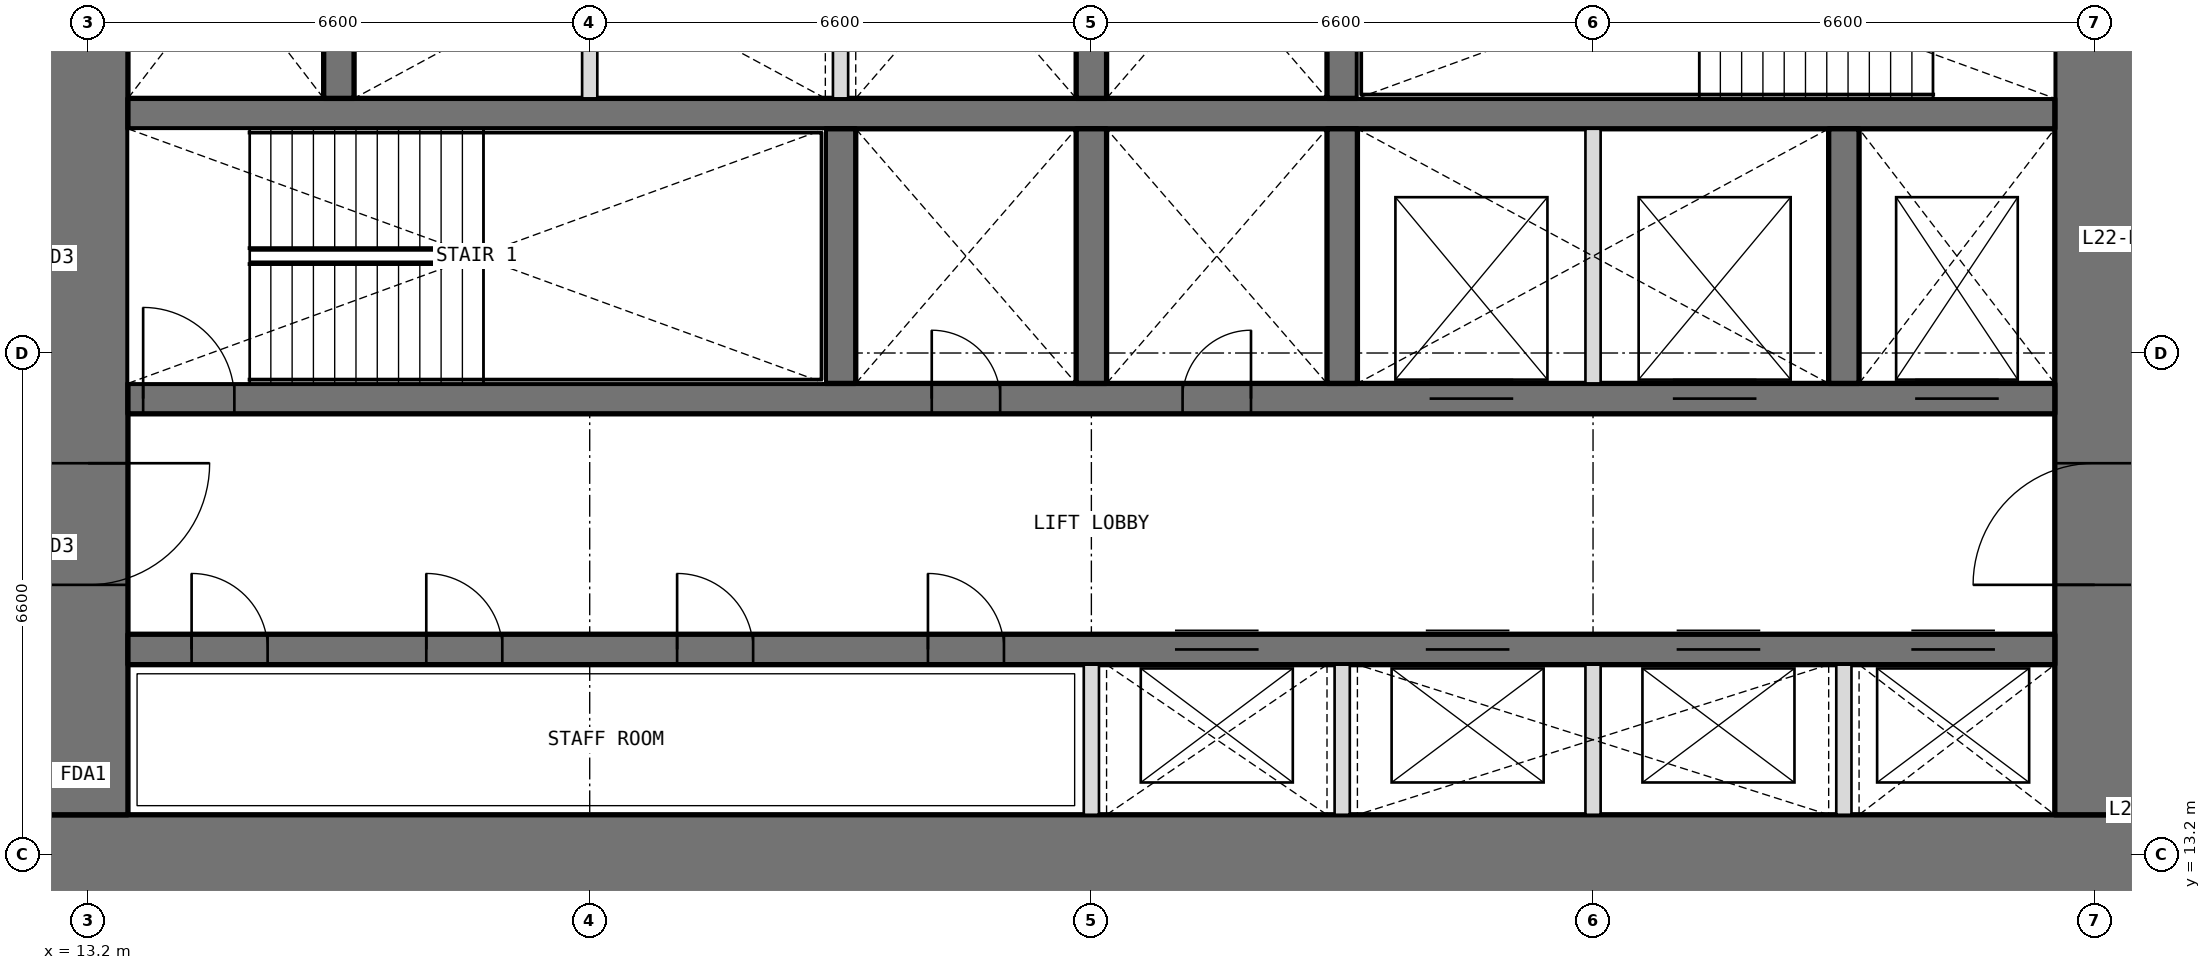
"""IFC4 building model, lengths in metres.
Left out: names, types, materials, properties, quantities, classifications, styles, units other than length and angle.
Written with IfcOpenShell. Run it as: python <this file> out.ifc"""

import sys

from ifc_helpers import new_model, si_unit, direction, frame, frame_2d, origin, place, context, subcontext, project, spatial, rectangle, extrude, element, fill, save


model = new_model("IFC4")
c1 = context("Model", 3, precision=1e-05, world=origin(), true_north=direction((0.0, 1.0)))
c2 = subcontext(c1, "Body", "Model", "MODEL_VIEW")
j1 = project(units=[si_unit("LENGTHUNIT", "METRE"), si_unit("PLANEANGLEUNIT", "RADIAN")], contexts=[c1])
p1 = place(None, origin())
s1 = spatial("IfcSite", under=j1, at=p1, CompositionType="ELEMENT")
p2 = place(p1, origin())
s2 = spatial("IfcBuilding", under=s1, at=p2, CompositionType="ELEMENT")
p3 = place(p2, frame((0.0, 0.0, 99.0)))
s3 = spatial("IfcBuildingStorey", under=s2, at=p3, CompositionType="ELEMENT", Elevation=99.0)
p4 = place(p3, frame((12.675, 13.2, 0.0), z_axis=(0.0, 0.0, 1.0), x_axis=(1.0, 0.0, 0.0)))
e1 = element("IfcWall", 1, at=p4, inside=s3, PredefinedType="SHEAR", context=c2, shape_type="SweptSolid", body=[
    extrude(rectangle(XDim=27.45, YDim=1.05, at=frame_2d((13.725, 0.0))), origin(), (0.0, 0.0, 1.0), 4.2),
])
p5 = place(p3, frame((39.6, 13.725, 0.0), z_axis=(0.0, 0.0, 1.0), x_axis=(0.0, 1.0, 0.0)))
e2 = element("IfcWall", 2, at=p5, inside=s3, PredefinedType="SHEAR", context=c2, shape_type="SweptSolid", body=[
    extrude(rectangle(XDim=18.75, YDim=1.05, at=frame_2d((9.375, 0.0))), origin(), (0.0, 0.0, 1.0), 4.2),
])
p6 = place(p5, frame((3.025, 0.0, 0.0)))
e3 = element("IfcOpeningElement", 3, at=p6, cuts=e2, PredefinedType="OPENING", context=c2, shape_type="SweptSolid", body=[
    extrude(rectangle(XDim=1.6, YDim=2.1, at=frame_2d((0.8, 1.05))), frame((0.0, 0.535, 0.0), z_axis=(0.0, -1.0, 0.0), x_axis=(1.0, 0.0, 0.0)), (0.0, 0.0, 1.0), 1.07),
])
p7 = place(p5, frame((13.825, 0.0, 0.0)))
e4 = element("IfcOpeningElement", 4, at=p7, cuts=e2, PredefinedType="OPENING", context=c2, shape_type="SweptSolid", body=[
    extrude(rectangle(XDim=1.6, YDim=2.1, at=frame_2d((0.8, 1.05))), frame((0.0, 0.535, 0.0), z_axis=(0.0, -1.0, 0.0), x_axis=(1.0, 0.0, 0.0)), (0.0, 0.0, 1.0), 1.07),
])
p8 = place(p3, frame((13.2, 32.475, 0.0), z_axis=(0.0, 0.0, 1.0), x_axis=(0.0, -1.0, 0.0)))
e5 = element("IfcWall", 5, at=p8, inside=s3, PredefinedType="SHEAR", context=c2, shape_type="SweptSolid", body=[
    extrude(rectangle(XDim=18.75, YDim=1.05, at=frame_2d((9.375, 0.0))), origin(), (0.0, 0.0, 1.0), 4.2),
])
p9 = place(p8, frame((14.125, 0.0, 0.0)))
e6 = element("IfcOpeningElement", 6, at=p9, cuts=e5, PredefinedType="OPENING", context=c2, shape_type="SweptSolid", body=[
    extrude(rectangle(XDim=1.6, YDim=2.1, at=frame_2d((0.8, 1.05))), frame((0.0, 0.535, 0.0), z_axis=(0.0, -1.0, 0.0), x_axis=(1.0, 0.0, 0.0)), (0.0, 0.0, 1.0), 1.07),
])
p10 = place(p8, frame((3.325, 0.0, 0.0)))
e7 = element("IfcOpeningElement", 7, at=p10, cuts=e5, PredefinedType="OPENING", context=c2, shape_type="SweptSolid", body=[
    extrude(rectangle(XDim=1.6, YDim=2.1, at=frame_2d((0.8, 1.05))), frame((0.0, 0.535, 0.0), z_axis=(0.0, -1.0, 0.0), x_axis=(1.0, 0.0, 0.0)), (0.0, 0.0, 1.0), 1.07),
])
p11 = place(p3, frame((13.725, 15.9, 0.0), z_axis=(0.0, 0.0, 1.0), x_axis=(1.0, 0.0, 0.0)))
e8 = element("IfcWall", 8, at=p11, inside=s3, PredefinedType="SHEAR", context=c2, shape_type="SweptSolid", body=[
    extrude(rectangle(XDim=25.35, YDim=0.4, at=frame_2d((12.675, 0.0))), origin(), (0.0, 0.0, 1.0), 4.2),
])
p12 = place(p11, frame((0.837, 0.0, 0.0)))
e9 = element("IfcOpeningElement", 9, at=p12, cuts=e8, PredefinedType="OPENING", context=c2, shape_type="SweptSolid", body=[
    extrude(rectangle(XDim=1.0, YDim=2.1, at=frame_2d((0.5, 1.05))), frame((0.0, 0.21, 0.0), z_axis=(0.0, -1.0, 0.0), x_axis=(1.0, 0.0, 0.0)), (0.0, 0.0, 1.0), 0.42),
])
p13 = place(p11, frame((3.925, 0.0, 0.0)))
e10 = element("IfcOpeningElement", 10, at=p13, cuts=e8, PredefinedType="OPENING", context=c2, shape_type="SweptSolid", body=[
    extrude(rectangle(XDim=1.0, YDim=2.1, at=frame_2d((0.5, 1.05))), frame((0.0, 0.21, 0.0), z_axis=(0.0, -1.0, 0.0), x_axis=(1.0, 0.0, 0.0)), (0.0, 0.0, 1.0), 0.42),
])
p14 = place(p11, frame((7.225, 0.0, 0.0)))
e11 = element("IfcOpeningElement", 11, at=p14, cuts=e8, PredefinedType="OPENING", context=c2, shape_type="SweptSolid", body=[
    extrude(rectangle(XDim=1.0, YDim=2.1, at=frame_2d((0.5, 1.05))), frame((0.0, 0.21, 0.0), z_axis=(0.0, -1.0, 0.0), x_axis=(1.0, 0.0, 0.0)), (0.0, 0.0, 1.0), 0.42),
])
p15 = place(p11, frame((10.525, 0.0, 0.0)))
e12 = element("IfcOpeningElement", 12, at=p15, cuts=e8, PredefinedType="OPENING", context=c2, shape_type="SweptSolid", body=[
    extrude(rectangle(XDim=1.0, YDim=2.1, at=frame_2d((0.5, 1.05))), frame((0.0, 0.21, 0.0), z_axis=(0.0, -1.0, 0.0), x_axis=(1.0, 0.0, 0.0)), (0.0, 0.0, 1.0), 0.42),
])
p16 = place(p11, frame((13.775, 0.0, 0.0)))
e13 = element("IfcOpeningElement", 13, at=p16, cuts=e8, PredefinedType="OPENING", context=c2, shape_type="SweptSolid", body=[
    extrude(rectangle(XDim=1.1, YDim=2.1, at=frame_2d((0.55, 1.05))), frame((0.0, 0.21, 0.0), z_axis=(0.0, -1.0, 0.0), x_axis=(1.0, 0.0, 0.0)), (0.0, 0.0, 1.0), 0.42),
])
p17 = place(p11, frame((17.075, 0.0, 0.0)))
e14 = element("IfcOpeningElement", 14, at=p17, cuts=e8, PredefinedType="OPENING", context=c2, shape_type="SweptSolid", body=[
    extrude(rectangle(XDim=1.1, YDim=2.1, at=frame_2d((0.55, 1.05))), frame((0.0, 0.21, 0.0), z_axis=(0.0, -1.0, 0.0), x_axis=(1.0, 0.0, 0.0)), (0.0, 0.0, 1.0), 0.42),
])
p18 = place(p11, frame((20.375, 0.0, 0.0)))
e15 = element("IfcOpeningElement", 15, at=p18, cuts=e8, PredefinedType="OPENING", context=c2, shape_type="SweptSolid", body=[
    extrude(rectangle(XDim=1.1, YDim=2.1, at=frame_2d((0.55, 1.05))), frame((0.0, 0.21, 0.0), z_axis=(0.0, -1.0, 0.0), x_axis=(1.0, 0.0, 0.0)), (0.0, 0.0, 1.0), 0.42),
])
p19 = place(p11, frame((23.462, 0.0, 0.0)))
e16 = element("IfcOpeningElement", 16, at=p19, cuts=e8, PredefinedType="OPENING", context=c2, shape_type="SweptSolid", body=[
    extrude(rectangle(XDim=1.1, YDim=2.1, at=frame_2d((0.55, 1.05))), frame((0.0, 0.21, 0.0), z_axis=(0.0, -1.0, 0.0), x_axis=(1.0, 0.0, 0.0)), (0.0, 0.0, 1.0), 0.42),
])
p20 = place(p3, frame((13.725, 19.2, 0.0), z_axis=(0.0, 0.0, 1.0), x_axis=(1.0, 0.0, 0.0)))
e17 = element("IfcWall", 17, at=p20, inside=s3, PredefinedType="SHEAR", context=c2, shape_type="SweptSolid", body=[
    extrude(rectangle(XDim=25.35, YDim=0.4, at=frame_2d((12.675, 0.0))), origin(), (0.0, 0.0, 1.0), 4.2),
])
p21 = place(p20, frame((10.575, 0.0, 0.0)))
e18 = element("IfcOpeningElement", 18, at=p21, cuts=e17, PredefinedType="OPENING", context=c2, shape_type="SweptSolid", body=[
    extrude(rectangle(XDim=0.9, YDim=2.1, at=frame_2d((0.45, 1.05))), frame((0.0, 0.21, 0.0), z_axis=(0.0, -1.0, 0.0), x_axis=(1.0, 0.0, 0.0)), (0.0, 0.0, 1.0), 0.42),
])
p22 = place(p20, frame((13.875, 0.0, 0.0)))
e19 = element("IfcOpeningElement", 19, at=p22, cuts=e17, PredefinedType="OPENING", context=c2, shape_type="SweptSolid", body=[
    extrude(rectangle(XDim=0.9, YDim=2.1, at=frame_2d((0.45, 1.05))), frame((0.0, 0.21, 0.0), z_axis=(0.0, -1.0, 0.0), x_axis=(1.0, 0.0, 0.0)), (0.0, 0.0, 1.0), 0.42),
])
p23 = place(p20, frame((0.2, 0.0, 0.0)))
e20 = element("IfcOpeningElement", 20, at=p23, cuts=e17, PredefinedType="OPENING", context=c2, shape_type="SweptSolid", body=[
    extrude(rectangle(XDim=1.2, YDim=2.1, at=frame_2d((0.6, 1.05))), frame((0.0, 0.21, 0.0), z_axis=(0.0, -1.0, 0.0), x_axis=(1.0, 0.0, 0.0)), (0.0, 0.0, 1.0), 0.42),
])
p24 = place(p20, frame((23.512, 0.0, 0.0)))
e21 = element("IfcOpeningElement", 21, at=p24, cuts=e17, PredefinedType="OPENING", context=c2, shape_type="SweptSolid", body=[
    extrude(rectangle(XDim=1.1, YDim=2.1, at=frame_2d((0.55, 1.05))), frame((0.0, 0.21, 0.0), z_axis=(0.0, -1.0, 0.0), x_axis=(1.0, 0.0, 0.0)), (0.0, 0.0, 1.0), 0.42),
])
p25 = place(p20, frame((17.125, 0.0, 0.0)))
e22 = element("IfcOpeningElement", 22, at=p25, cuts=e17, PredefinedType="OPENING", context=c2, shape_type="SweptSolid", body=[
    extrude(rectangle(XDim=1.1, YDim=2.1, at=frame_2d((0.55, 1.05))), frame((0.0, 0.21, 0.0), z_axis=(0.0, -1.0, 0.0), x_axis=(1.0, 0.0, 0.0)), (0.0, 0.0, 1.0), 0.42),
])
p26 = place(p20, frame((20.325, 0.0, 0.0)))
e23 = element("IfcOpeningElement", 23, at=p26, cuts=e17, PredefinedType="OPENING", context=c2, shape_type="SweptSolid", body=[
    extrude(rectangle(XDim=1.1, YDim=2.1, at=frame_2d((0.55, 1.05))), frame((0.0, 0.21, 0.0), z_axis=(0.0, -1.0, 0.0), x_axis=(1.0, 0.0, 0.0)), (0.0, 0.0, 1.0), 0.42),
])
p27 = place(p3, frame((13.725, 22.95, 0.0), z_axis=(0.0, 0.0, 1.0), x_axis=(1.0, 0.0, 0.0)))
e24 = element("IfcWall", 24, at=p27, inside=s3, PredefinedType="SHEAR", context=c2, shape_type="SweptSolid", body=[
    extrude(rectangle(XDim=25.35, YDim=0.4, at=frame_2d((12.675, 0.0))), origin(), (0.0, 0.0, 1.0), 4.2),
])
for number, where, z_axis, x_axis in (
    (25, (23.1, 19.4, 0.0), (0.0, 0.0, 1.0), (0.0, 1.0, 0.0)),
    (26, (26.4, 19.4, 0.0), (0.0, 0.0, 1.0), (0.0, 1.0, 0.0)),
    (27, (29.7, 19.4, 0.0), (0.0, 0.0, 1.0), (0.0, 1.0, 0.0)),
    (28, (36.3, 19.4, 0.0), (0.0, 0.0, 1.0), (0.0, 1.0, 0.0)),
    (29, (16.5, 23.15, 0.0), (0.0, 0.0, 1.0), (0.0, 1.0, 0.0)),
    (30, (26.4, 23.15, 0.0), (0.0, 0.0, 1.0), (0.0, 1.0, 0.0)),
    (31, (29.7, 23.15, 0.0), (0.0, 0.0, 1.0), (0.0, 1.0, 0.0)),
):
    element("IfcWall", number, at=place(p3, frame(where, z_axis=z_axis, x_axis=x_axis)), inside=s3, PredefinedType="SHEAR", context=c2, shape_type="SweptSolid", body=[
        extrude(rectangle(XDim=3.35, YDim=0.4, at=frame_2d((1.675, 0.0))), origin(), (0.0, 0.0, 1.0), 4.2),
    ])
for number, where, z_axis, x_axis in (
    (32, (26.4, 13.725, 0.0), (0.0, 0.0, 1.0), (0.0, 1.0, 0.0)),
    (33, (29.7, 13.725, 0.0), (0.0, 0.0, 1.0), (0.0, 1.0, 0.0)),
    (34, (33.0, 13.725, 0.0), (0.0, 0.0, 1.0), (0.0, 1.0, 0.0)),
    (35, (36.3, 13.725, 0.0), (0.0, 0.0, 1.0), (0.0, 1.0, 0.0)),
):
    element("IfcWall", number, at=place(p3, frame(where, z_axis=z_axis, x_axis=x_axis)), inside=s3, PredefinedType="PARTITIONING", context=c2, shape_type="SweptSolid", body=[
        extrude(rectangle(XDim=1.975, YDim=0.2, at=frame_2d((0.987, 0.0))), origin(), (0.0, 0.0, 1.0), 4.2),
    ])
for number, where, z_axis, x_axis in (
    (36, (33.0, 19.4, 0.0), (0.0, 0.0, 1.0), (0.0, 1.0, 0.0)),
    (37, (19.8, 23.15, 0.0), (0.0, 0.0, 1.0), (0.0, 1.0, 0.0)),
    (38, (23.1, 23.15, 0.0), (0.0, 0.0, 1.0), (0.0, 1.0, 0.0)),
):
    element("IfcWall", number, at=place(p3, frame(where, z_axis=z_axis, x_axis=x_axis)), inside=s3, PredefinedType="PARTITIONING", context=c2, shape_type="SweptSolid", body=[
        extrude(rectangle(XDim=3.35, YDim=0.2, at=frame_2d((1.675, 0.0))), origin(), (0.0, 0.0, 1.0), 4.2),
    ])
p28 = place(p21, origin())
e39 = element("IfcDoor", 39, at=p28, inside=s3, OperationType="SINGLE_SWING_LEFT", PredefinedType="DOOR", context=c2, shape_type="SweptSolid", body=[
    extrude(rectangle(XDim=0.9, YDim=2.1, at=frame_2d((0.45, 1.05))), frame((0.0, 0.025, 0.0), z_axis=(0.0, -1.0, 0.0), x_axis=(1.0, 0.0, 0.0)), (0.0, 0.0, 1.0), 0.05),
])
fill(e18, e39)
p29 = place(p22, origin())
e40 = element("IfcDoor", 40, at=p29, inside=s3, OperationType="SINGLE_SWING_RIGHT", PredefinedType="DOOR", context=c2, shape_type="SweptSolid", body=[
    extrude(rectangle(XDim=0.9, YDim=2.1, at=frame_2d((0.45, 1.05))), frame((0.0, 0.025, 0.0), z_axis=(0.0, -1.0, 0.0), x_axis=(1.0, 0.0, 0.0)), (0.0, 0.0, 1.0), 0.05),
])
fill(e19, e40)
p30 = place(p12, origin())
e41 = element("IfcDoor", 41, at=p30, inside=s3, OperationType="SINGLE_SWING_LEFT", PredefinedType="DOOR", context=c2, shape_type="SweptSolid", body=[
    extrude(rectangle(XDim=1.0, YDim=2.1, at=frame_2d((0.5, 1.05))), frame((0.0, 0.025, 0.0), z_axis=(0.0, -1.0, 0.0), x_axis=(1.0, 0.0, 0.0)), (0.0, 0.0, 1.0), 0.05),
])
fill(e9, e41)
p31 = place(p13, origin())
e42 = element("IfcDoor", 42, at=p31, inside=s3, OperationType="SINGLE_SWING_LEFT", PredefinedType="DOOR", context=c2, shape_type="SweptSolid", body=[
    extrude(rectangle(XDim=1.0, YDim=2.1, at=frame_2d((0.5, 1.05))), frame((0.0, 0.025, 0.0), z_axis=(0.0, -1.0, 0.0), x_axis=(1.0, 0.0, 0.0)), (0.0, 0.0, 1.0), 0.05),
])
fill(e10, e42)
p32 = place(p14, origin())
e43 = element("IfcDoor", 43, at=p32, inside=s3, OperationType="SINGLE_SWING_LEFT", PredefinedType="DOOR", context=c2, shape_type="SweptSolid", body=[
    extrude(rectangle(XDim=1.0, YDim=2.1, at=frame_2d((0.5, 1.05))), frame((0.0, 0.025, 0.0), z_axis=(0.0, -1.0, 0.0), x_axis=(1.0, 0.0, 0.0)), (0.0, 0.0, 1.0), 0.05),
])
fill(e11, e43)
p33 = place(p15, origin())
e44 = element("IfcDoor", 44, at=p33, inside=s3, OperationType="SINGLE_SWING_LEFT", PredefinedType="DOOR", context=c2, shape_type="SweptSolid", body=[
    extrude(rectangle(XDim=1.0, YDim=2.1, at=frame_2d((0.5, 1.05))), frame((0.0, 0.025, 0.0), z_axis=(0.0, -1.0, 0.0), x_axis=(1.0, 0.0, 0.0)), (0.0, 0.0, 1.0), 0.05),
])
fill(e12, e44)
p34 = place(p23, origin())
e45 = element("IfcDoor", 45, at=p34, inside=s3, OperationType="SINGLE_SWING_LEFT", PredefinedType="DOOR", context=c2, shape_type="SweptSolid", body=[
    extrude(rectangle(XDim=1.2, YDim=2.1, at=frame_2d((0.6, 1.05))), frame((0.0, 0.025, 0.0), z_axis=(0.0, -1.0, 0.0), x_axis=(1.0, 0.0, 0.0)), (0.0, 0.0, 1.0), 0.05),
])
fill(e20, e45)
p35 = place(p9, origin())
e46 = element("IfcDoor", 46, at=p35, inside=s3, OperationType="DOUBLE_DOOR_DOUBLE_SWING", PredefinedType="DOOR", context=c2, shape_type="SweptSolid", body=[
    extrude(rectangle(XDim=1.6, YDim=2.1, at=frame_2d((0.8, 1.05))), frame((0.0, 0.025, 0.0), z_axis=(0.0, -1.0, 0.0), x_axis=(1.0, 0.0, 0.0)), (0.0, 0.0, 1.0), 0.05),
])
fill(e6, e46)
p36 = place(p6, origin())
e47 = element("IfcDoor", 47, at=p36, inside=s3, OperationType="DOUBLE_DOOR_DOUBLE_SWING", PredefinedType="DOOR", context=c2, shape_type="SweptSolid", body=[
    extrude(rectangle(XDim=1.6, YDim=2.1, at=frame_2d((0.8, 1.05))), frame((0.0, 0.025, 0.0), z_axis=(0.0, -1.0, 0.0), x_axis=(1.0, 0.0, 0.0)), (0.0, 0.0, 1.0), 0.05),
])
fill(e3, e47)
p37 = place(p16, origin())
e48 = element("IfcDoor", 48, at=p37, inside=s3, OperationType="DOUBLE_DOOR_SLIDING", PredefinedType="DOOR", context=c2, shape_type="SweptSolid", body=[
    extrude(rectangle(XDim=1.1, YDim=2.1, at=frame_2d((0.55, 1.05))), frame((0.0, 0.025, 0.0), z_axis=(0.0, -1.0, 0.0), x_axis=(1.0, 0.0, 0.0)), (0.0, 0.0, 1.0), 0.05),
])
fill(e13, e48)
p38 = place(p17, origin())
e49 = element("IfcDoor", 49, at=p38, inside=s3, OperationType="DOUBLE_DOOR_SLIDING", PredefinedType="DOOR", context=c2, shape_type="SweptSolid", body=[
    extrude(rectangle(XDim=1.1, YDim=2.1, at=frame_2d((0.55, 1.05))), frame((0.0, 0.025, 0.0), z_axis=(0.0, -1.0, 0.0), x_axis=(1.0, 0.0, 0.0)), (0.0, 0.0, 1.0), 0.05),
])
fill(e14, e49)
p39 = place(p18, origin())
e50 = element("IfcDoor", 50, at=p39, inside=s3, OperationType="DOUBLE_DOOR_SLIDING", PredefinedType="DOOR", context=c2, shape_type="SweptSolid", body=[
    extrude(rectangle(XDim=1.1, YDim=2.1, at=frame_2d((0.55, 1.05))), frame((0.0, 0.025, 0.0), z_axis=(0.0, -1.0, 0.0), x_axis=(1.0, 0.0, 0.0)), (0.0, 0.0, 1.0), 0.05),
])
fill(e15, e50)
p40 = place(p19, origin())
e51 = element("IfcDoor", 51, at=p40, inside=s3, OperationType="DOUBLE_DOOR_SLIDING", PredefinedType="DOOR", context=c2, shape_type="SweptSolid", body=[
    extrude(rectangle(XDim=1.1, YDim=2.1, at=frame_2d((0.55, 1.05))), frame((0.0, 0.025, 0.0), z_axis=(0.0, -1.0, 0.0), x_axis=(1.0, 0.0, 0.0)), (0.0, 0.0, 1.0), 0.05),
])
fill(e16, e51)
p41 = place(p24, origin())
e52 = element("IfcDoor", 52, at=p41, inside=s3, OperationType="DOUBLE_DOOR_SLIDING", PredefinedType="DOOR", context=c2, shape_type="SweptSolid", body=[
    extrude(rectangle(XDim=1.1, YDim=2.1, at=frame_2d((0.55, 1.05))), frame((0.0, 0.025, 0.0), z_axis=(0.0, -1.0, 0.0), x_axis=(1.0, 0.0, 0.0)), (0.0, 0.0, 1.0), 0.05),
])
fill(e21, e52)
p42 = place(p25, origin())
e53 = element("IfcDoor", 53, at=p42, inside=s3, OperationType="DOUBLE_DOOR_SLIDING", PredefinedType="DOOR", context=c2, shape_type="SweptSolid", body=[
    extrude(rectangle(XDim=1.1, YDim=2.1, at=frame_2d((0.55, 1.05))), frame((0.0, 0.025, 0.0), z_axis=(0.0, -1.0, 0.0), x_axis=(1.0, 0.0, 0.0)), (0.0, 0.0, 1.0), 0.05),
])
fill(e22, e53)
p43 = place(p26, origin())
e54 = element("IfcDoor", 54, at=p43, inside=s3, OperationType="DOUBLE_DOOR_SLIDING", PredefinedType="DOOR", context=c2, shape_type="SweptSolid", body=[
    extrude(rectangle(XDim=1.1, YDim=2.1, at=frame_2d((0.55, 1.05))), frame((0.0, 0.025, 0.0), z_axis=(0.0, -1.0, 0.0), x_axis=(1.0, 0.0, 0.0)), (0.0, 0.0, 1.0), 0.05),
])
fill(e23, e54)
save(model, sys.argv[1])
